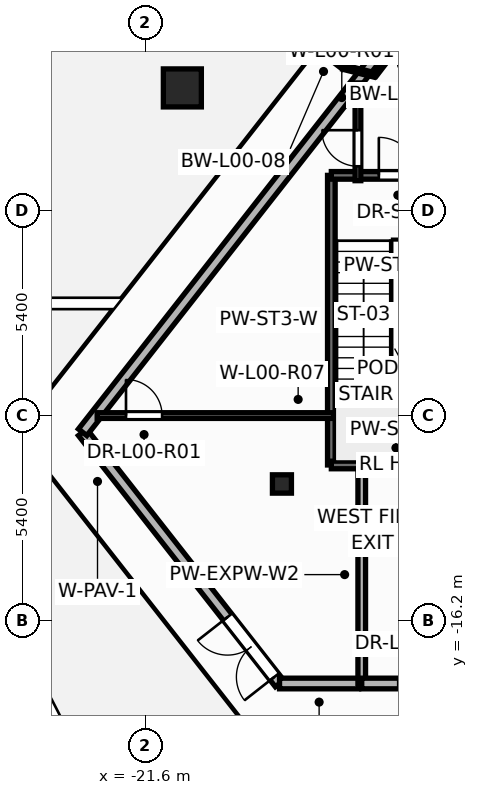
"""IFC4 building model, lengths in metres.
Left out: names, types, materials, properties, quantities, classifications, styles, units other than length and angle.
Written with IfcOpenShell. Run it as: python <this file> out.ifc"""

import sys

from ifc_helpers import new_model, si_unit, direction, frame, frame_2d, origin, origin_2d, place, context, subcontext, project, spatial, rectangle, hollow_circle, i_section, extrude, element, fill, save


model = new_model("IFC4")
c1 = context("Model", 3, precision=1e-05, world=origin(), true_north=direction((0.0, 1.0)))
c2 = subcontext(c1, "Body", "Model", "MODEL_VIEW")
j1 = project(units=[si_unit("LENGTHUNIT", "METRE"), si_unit("PLANEANGLEUNIT", "RADIAN")], contexts=[c1])
p1 = place(None, origin())
s1 = spatial("IfcSite", under=j1, at=p1, CompositionType="ELEMENT")
p2 = place(p1, origin())
s2 = spatial("IfcBuilding", under=s1, at=p2, CompositionType="ELEMENT")
p3 = place(p2, origin())
s3 = spatial("IfcBuildingStorey", under=s2, at=p3, CompositionType="ELEMENT", Elevation=0.0)
p4 = place(p3, frame((-20.62, -2.179, 0.0), z_axis=(0.0, 0.0, 1.0), x_axis=(1.0, 0.0, 0.0)))
e1 = element("IfcColumn", 1, at=p4, inside=s3, PredefinedType="COLUMN", context=c2, shape_type="SweptSolid", body=[
    extrude(hollow_circle(Radius=0.5, WallThickness=0.045, at=origin_2d()), origin(), (0.0, 0.0, 1.0), 5.4),
])
p5 = place(p3, frame((-18.0, -12.6, 0.0), z_axis=(0.0, 0.0, 1.0), x_axis=(1.0, 0.0, 0.0)))
e2 = element("IfcColumn", 2, at=p5, inside=s3, PredefinedType="COLUMN", context=c2, shape_type="SweptSolid", body=[
    extrude(i_section(OverallWidth=0.5, OverallDepth=0.482, WebThickness=0.04, FlangeThickness=0.045, at=origin_2d()), origin(), (0.0, 0.0, 1.0), 5.4),
])
p6 = place(p3, frame((-18.063, -17.85, -0.015), z_axis=(0.0, 0.0, 1.0), x_axis=(-0.616936653938, 0.787012811222, 0.0)))
e3 = element("IfcWall", 3, at=p6, inside=s3, PredefinedType="STANDARD", context=c2, shape_type="SweptSolid", body=[
    extrude(rectangle(XDim=8.399, YDim=0.28, at=frame_2d((4.199, 0.0))), origin(), (0.0, 0.0, 1.0), 5.135),
])
p7 = place(p6, frame((0.22, 0.0, 0.015)))
e4 = element("IfcOpeningElement", 4, at=p7, cuts=e3, PredefinedType="OPENING", context=c2, shape_type="SweptSolid", body=[
    extrude(rectangle(XDim=2.006, YDim=2.304, at=frame_2d((1.0, 1.152))), frame((0.0, 0.15, 0.0), z_axis=(0.0, -1.0, 0.0), x_axis=(1.0, 0.0, 0.0)), (0.0, 0.0, 1.0), 0.3),
])
p8 = place(p3, frame((-15.98, -17.85, -0.015), z_axis=(0.0, 0.0, 1.0), x_axis=(-1.0, 0.0, 0.0)))
e5 = element("IfcWall", 5, at=p8, inside=s3, PredefinedType="STANDARD", context=c2, shape_type="SweptSolid", body=[
    extrude(rectangle(XDim=2.083, YDim=0.28, at=frame_2d((1.042, 0.0))), origin(), (0.0, 0.0, 1.0), 5.135),
])
p9 = place(p3, frame((-23.245, -11.24, -0.015), z_axis=(0.0, 0.0, 1.0), x_axis=(0.616945483616, 0.787005889588, 0.0)))
e6 = element("IfcWall", 6, at=p9, inside=s3, PredefinedType="STANDARD", context=c2, shape_type="SweptSolid", body=[
    extrude(rectangle(XDim=28.627, YDim=0.28, at=frame_2d((14.314, 0.0))), origin(), (0.0, 0.0, 1.0), 3.91),
])
p10 = place(p3, frame((-16.7, -12.1, 0.0), z_axis=(0.0, 0.0, 1.0), x_axis=(0.0, 1.0, 0.0)))
e7 = element("IfcWall", 7, at=p10, inside=s3, PredefinedType="SOLIDWALL", context=c2, shape_type="SweptSolid", body=[
    extrude(rectangle(XDim=7.62, YDim=0.2, at=frame_2d((3.81, 0.0))), origin(), (0.0, 0.0, 1.0), 5.4),
])
p11 = place(p3, frame((-22.862, -10.8, 0.0), z_axis=(0.0, 0.0, 1.0), x_axis=(1.0, 0.0, 0.0)))
e8 = element("IfcWall", 8, at=p11, inside=s3, PredefinedType="PARTITIONING", context=c2, shape_type="SweptSolid", body=[
    extrude(rectangle(XDim=6.222, YDim=0.15, at=frame_2d((3.111, 0.0))), origin(), (0.0, 0.0, 1.0), 5.12),
])
p12 = place(p11, frame((0.758, 0.0, 0.0)))
e9 = element("IfcOpeningElement", 9, at=p12, cuts=e8, PredefinedType="OPENING", context=c2, shape_type="SweptSolid", body=[
    extrude(rectangle(XDim=0.956, YDim=2.104, at=frame_2d((0.475, 1.052))), frame((0.0, 0.085, 0.0), z_axis=(0.0, -1.0, 0.0), x_axis=(1.0, 0.0, 0.0)), (0.0, 0.0, 1.0), 0.17),
])
p13 = place(p3, frame((-15.9, -17.85, 0.0), z_axis=(0.0, 0.0, 1.0), x_axis=(0.0, 1.0, 0.0)))
e10 = element("IfcWall", 10, at=p13, inside=s3, PredefinedType="SOLIDWALL", context=c2, shape_type="SweptSolid", body=[
    extrude(rectangle(XDim=5.73, YDim=0.2, at=frame_2d((2.865, 0.0))), origin(), (0.0, 0.0, 1.0), 5.12),
])
p14 = place(p3, frame((-16.7, -12.1, 0.0), z_axis=(0.0, 0.0, 1.0), x_axis=(1.0, 0.0, 0.0)))
e11 = element("IfcWall", 11, at=p14, inside=s3, PredefinedType="SOLIDWALL", context=c2, shape_type="SweptSolid", body=[
    extrude(rectangle(XDim=3.4, YDim=0.2, at=frame_2d((1.7, 0.0))), origin(), (0.0, 0.0, 1.0), 5.4),
])
p15 = place(p3, frame((-16.7, -4.48, 0.0), z_axis=(0.0, 0.0, 1.0), x_axis=(1.0, 0.0, 0.0)))
e12 = element("IfcWall", 12, at=p15, inside=s3, PredefinedType="SOLIDWALL", context=c2, shape_type="SweptSolid", body=[
    extrude(rectangle(XDim=3.4, YDim=0.2, at=frame_2d((1.7, 0.0))), origin(), (0.0, 0.0, 1.0), 5.4),
])
p16 = place(p15, frame((1.25, 0.0, 0.0)))
e13 = element("IfcOpeningElement", 13, at=p16, cuts=e12, PredefinedType="OPENING", context=c2, shape_type="SweptSolid", body=[
    extrude(rectangle(XDim=1.006, YDim=2.104, at=frame_2d((0.5, 1.052))), frame((0.0, 0.11, 0.0), z_axis=(0.0, -1.0, 0.0), x_axis=(1.0, 0.0, 0.0)), (0.0, 0.0, 1.0), 0.22),
])
p17 = place(p3, frame((-12.78, -17.85, 0.0), z_axis=(0.0, 0.0, 1.0), x_axis=(-1.0, 0.0, 0.0)))
e14 = element("IfcWall", 14, at=p17, inside=s3, PredefinedType="STANDARD", context=c2, shape_type="SweptSolid", body=[
    extrude(rectangle(XDim=3.12, YDim=0.28, at=frame_2d((1.56, 0.0))), origin(), (0.0, 0.0, 1.0), 5.12),
])
p18 = place(p17, frame((0.96, 0.0, 0.0)))
e15 = element("IfcOpeningElement", 15, at=p18, cuts=e14, PredefinedType="OPENING", context=c2, shape_type="SweptSolid", body=[
    extrude(rectangle(XDim=1.206, YDim=2.154, at=frame_2d((0.6, 1.077))), frame((0.0, 0.15, 0.0), z_axis=(0.0, -1.0, 0.0), x_axis=(1.0, 0.0, 0.0)), (0.0, 0.0, 1.0), 0.3),
])
p19 = place(p3, frame((-16.0, -4.62, 0.0), z_axis=(0.0, 0.0, 1.0), x_axis=(0.0, 1.0, 0.0)))
e16 = element("IfcWall", 16, at=p19, inside=s3, PredefinedType="PARTITIONING", context=c2, shape_type="SweptSolid", body=[
    extrude(rectangle(XDim=2.573, YDim=0.15, at=frame_2d((1.287, 0.0))), origin(), (0.0, 0.0, 1.0), 5.12),
])
p20 = place(p19, frame((0.379, 0.0, 0.0)))
e17 = element("IfcOpeningElement", 17, at=p20, cuts=e16, PredefinedType="OPENING", context=c2, shape_type="SweptSolid", body=[
    extrude(rectangle(XDim=0.956, YDim=2.104, at=frame_2d((0.475, 1.052))), frame((0.0, 0.085, 0.0), z_axis=(0.0, -1.0, 0.0), x_axis=(1.0, 0.0, 0.0)), (0.0, 0.0, 1.0), 0.17),
])
p21 = place(p3, frame((-14.788, -0.82, 0.0), z_axis=(0.0, 0.0, 1.0), x_axis=(-0.608207299469, -0.793778231543, 0.0)))
e18 = element("IfcWall", 18, at=p21, inside=s3, PredefinedType="PARTITIONING", context=c2, shape_type="SweptSolid", body=[
    extrude(rectangle(XDim=1.28, YDim=0.12, at=frame_2d((0.64, 0.0))), origin(), (0.0, 0.0, 1.0), 5.12),
])
p22 = place(p3, frame((-15.567, -1.836, 0.0), z_axis=(0.0, 0.0, 1.0), x_axis=(-0.969885196515, 0.243562529098, 0.0)))
e19 = element("IfcWall", 19, at=p22, inside=s3, PredefinedType="PARTITIONING", context=c2, shape_type="SweptSolid", body=[
    extrude(rectangle(XDim=0.839, YDim=0.12, at=frame_2d((0.419, 0.0))), origin(), (0.0, 0.0, 1.0), 5.12),
])
p23 = place(p3, frame((-16.381, -1.632, 0.0), z_axis=(0.0, 0.0, 1.0), x_axis=(-0.79396842603, 0.607958994068, 0.0)))
e20 = element("IfcWall", 20, at=p23, inside=s3, PredefinedType="PARTITIONING", context=c2, shape_type="SweptSolid", body=[
    extrude(rectangle(XDim=0.694, YDim=0.12, at=frame_2d((0.347, 0.0))), origin(), (0.0, 0.0, 1.0), 5.12),
])
p24 = place(p7, origin())
e21 = element("IfcDoor", 21, at=p24, inside=s3, OperationType="DOUBLE_DOOR_SINGLE_SWING", PredefinedType="DOOR", context=c2, shape_type="SweptSolid", body=[
    extrude(rectangle(XDim=2.0, YDim=2.3, at=frame_2d((1.0, 1.15))), frame((0.0, 0.025, 0.0), z_axis=(0.0, -1.0, 0.0), x_axis=(1.0, 0.0, 0.0)), (0.0, 0.0, 1.0), 0.05),
])
fill(e4, e21)
p25 = place(p16, origin())
e22 = element("IfcDoor", 22, at=p25, inside=s3, OperationType="SINGLE_SWING_LEFT", PredefinedType="DOOR", context=c2, shape_type="SweptSolid", body=[
    extrude(rectangle(XDim=1.0, YDim=2.1, at=frame_2d((0.5, 1.05))), frame((0.0, 0.025, 0.0), z_axis=(0.0, -1.0, 0.0), x_axis=(1.0, 0.0, 0.0)), (0.0, 0.0, 1.0), 0.05),
])
fill(e13, e22)
p26 = place(p12, origin())
e23 = element("IfcDoor", 23, at=p26, inside=s3, OperationType="SINGLE_SWING_LEFT", PredefinedType="DOOR", context=c2, shape_type="SweptSolid", body=[
    extrude(rectangle(XDim=0.95, YDim=2.1, at=frame_2d((0.475, 1.05))), frame((0.0, 0.025, 0.0), z_axis=(0.0, -1.0, 0.0), x_axis=(1.0, 0.0, 0.0)), (0.0, 0.0, 1.0), 0.05),
])
fill(e9, e23)
p27 = place(p20, origin())
e24 = element("IfcDoor", 24, at=p27, inside=s3, OperationType="SINGLE_SWING_RIGHT", PredefinedType="DOOR", context=c2, shape_type="SweptSolid", body=[
    extrude(rectangle(XDim=0.95, YDim=2.1, at=frame_2d((0.475, 1.05))), frame((0.0, 0.025, 0.0), z_axis=(0.0, -1.0, 0.0), x_axis=(1.0, 0.0, 0.0)), (0.0, 0.0, 1.0), 0.05),
])
fill(e17, e24)
save(model, sys.argv[1])
